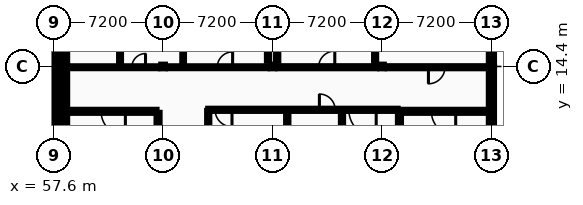
"""IFC4 building model, lengths in metres.
Left out: names, types, materials, properties, quantities, classifications, styles, units other than length and angle.
Written with IfcOpenShell. Run it as: python <this file> out.ifc"""

import sys

from ifc_helpers import new_model, si_unit, direction, frame, frame_2d, origin, origin_2d, place, context, subcontext, project, spatial, rectangle, i_section, extrude, element, fill, save


model = new_model("IFC4")
c1 = context("Model", 3, precision=1e-05, world=origin(), true_north=direction((0.0, 1.0)))
c2 = subcontext(c1, "Body", "Model", "MODEL_VIEW")
j1 = project(units=[si_unit("LENGTHUNIT", "METRE"), si_unit("PLANEANGLEUNIT", "RADIAN")], contexts=[c1])
p1 = place(None, origin())
s1 = spatial("IfcSite", under=j1, at=p1, CompositionType="ELEMENT")
p2 = place(p1, origin())
s2 = spatial("IfcBuilding", under=s1, at=p2, CompositionType="ELEMENT")
p3 = place(p2, frame((0.0, 0.0, 18.4)))
s3 = spatial("IfcBuildingStorey", under=s2, at=p3, CompositionType="ELEMENT", Elevation=18.4)
for number, where, z_axis, x_axis in (
    (1, (57.6, 14.4, 0.0), (0.0, 0.0, 1.0), (1.0, 0.0, 0.0)),
    (2, (58.32, 14.4, 0.0), (0.0, 0.0, 1.0), (1.0, 0.0, 0.0)),
    (3, (64.8, 14.4, 0.0), (0.0, 0.0, 1.0), (1.0, 0.0, 0.0)),
    (4, (72.0, 14.4, 0.0), (0.0, 0.0, 1.0), (1.0, 0.0, 0.0)),
    (5, (79.2, 14.4, 0.0), (0.0, 0.0, 1.0), (1.0, 0.0, 0.0)),
    (6, (86.4, 14.4, 0.0), (0.0, 0.0, 1.0), (1.0, 0.0, 0.0)),
):
    element("IfcColumn", number, at=place(p3, frame(where, z_axis=z_axis, x_axis=x_axis)), inside=s3, PredefinedType="COLUMN", context=c2, shape_type="SweptSolid", body=[
        extrude(i_section(OverallWidth=0.24, OverallDepth=0.24, WebThickness=0.01, FlangeThickness=0.017, FilletRadius=0.021, at=origin_2d()), origin(), (0.0, 0.0, 1.0), 4.4),
    ])
p4 = place(p3, frame((57.6, 8.9, 0.0), z_axis=(0.0, 0.0, 1.0), x_axis=(0.0, 1.0, 0.0)))
e7 = element("IfcWall", 7, at=p4, inside=s3, PredefinedType="STANDARD", context=c2, shape_type="SweptSolid", body=[
    extrude(rectangle(XDim=5.5, YDim=0.34, at=frame_2d((2.75, 0.0))), origin(), (0.0, 0.0, 1.0), 4.11),
])
p5 = place(p3, frame((57.6, 14.4, 0.0), z_axis=(0.0, 0.0, 1.0), x_axis=(0.0, 1.0, 0.0)))
e8 = element("IfcWall", 8, at=p5, inside=s3, PredefinedType="STANDARD", context=c2, shape_type="SweptSolid", body=[
    extrude(rectangle(XDim=7.37, YDim=0.34, at=frame_2d((3.685, 0.0))), origin(), (0.0, 0.0, 1.0), 4.11),
])
p6 = place(p5, frame((1.311, 0.0, 0.95)))
e9 = element("IfcOpeningElement", 9, at=p6, cuts=e8, PredefinedType="OPENING", context=c2, shape_type="SweptSolid", body=[
    extrude(rectangle(XDim=1.8, YDim=1.85, at=frame_2d((0.9, 0.925))), frame((0.0, 0.18, 0.0), z_axis=(0.0, -1.0, 0.0), x_axis=(1.0, 0.0, 0.0)), (0.0, 0.0, 1.0), 0.36),
])
p7 = place(p5, frame((4.259, 0.0, 0.95)))
e10 = element("IfcOpeningElement", 10, at=p7, cuts=e8, PredefinedType="OPENING", context=c2, shape_type="SweptSolid", body=[
    extrude(rectangle(XDim=1.8, YDim=1.85, at=frame_2d((0.9, 0.925))), frame((0.0, 0.18, 0.0), z_axis=(0.0, -1.0, 0.0), x_axis=(1.0, 0.0, 0.0)), (0.0, 0.0, 1.0), 0.36),
])
p8 = place(p3, frame((58.32, 14.4, 0.0), z_axis=(0.0, 0.0, 1.0), x_axis=(0.0, -1.0, 0.0)))
e11 = element("IfcWall", 11, at=p8, inside=s3, PredefinedType="STANDARD", context=c2, shape_type="SweptSolid", body=[
    extrude(rectangle(XDim=5.5, YDim=0.34, at=frame_2d((2.75, 0.0))), origin(), (0.0, 0.0, 1.0), 4.11),
])
p9 = place(p3, frame((58.32, 21.77, 0.0), z_axis=(0.0, 0.0, 1.0), x_axis=(0.0, -1.0, 0.0)))
e12 = element("IfcWall", 12, at=p9, inside=s3, PredefinedType="STANDARD", context=c2, shape_type="SweptSolid", body=[
    extrude(rectangle(XDim=7.37, YDim=0.34, at=frame_2d((3.685, 0.0))), origin(), (0.0, 0.0, 1.0), 4.11),
])
p10 = place(p9, frame((1.594, 0.0, 0.95)))
e13 = element("IfcOpeningElement", 13, at=p10, cuts=e12, PredefinedType="OPENING", context=c2, shape_type="SweptSolid", body=[
    extrude(rectangle(XDim=1.234, YDim=1.368, at=frame_2d((0.617, 0.684))), frame((0.0, 0.18, 0.0), z_axis=(0.0, -1.0, 0.0), x_axis=(1.0, 0.0, 0.0)), (0.0, 0.0, 1.0), 0.36),
])
p11 = place(p9, frame((4.542, 0.0, 0.95)))
e14 = element("IfcOpeningElement", 14, at=p11, cuts=e12, PredefinedType="OPENING", context=c2, shape_type="SweptSolid", body=[
    extrude(rectangle(XDim=1.234, YDim=1.368, at=frame_2d((0.617, 0.684))), frame((0.0, 0.18, 0.0), z_axis=(0.0, -1.0, 0.0), x_axis=(1.0, 0.0, 0.0)), (0.0, 0.0, 1.0), 0.36),
])
p12 = place(p3, frame((86.4, 8.9, 0.0), z_axis=(0.0, 0.0, 1.0), x_axis=(0.0, 1.0, 0.0)))
e15 = element("IfcWall", 15, at=p12, inside=s3, PredefinedType="STANDARD", context=c2, shape_type="SweptSolid", body=[
    extrude(rectangle(XDim=5.5, YDim=0.34, at=frame_2d((2.75, 0.0))), origin(), (0.0, 0.0, 1.0), 4.11),
])
p13 = place(p3, frame((86.4, 14.4, 0.0), z_axis=(0.0, 0.0, 1.0), x_axis=(0.0, 1.0, 0.0)))
e16 = element("IfcWall", 16, at=p13, inside=s3, PredefinedType="STANDARD", context=c2, shape_type="SweptSolid", body=[
    extrude(rectangle(XDim=7.03, YDim=0.34, at=frame_2d((3.515, 0.0))), origin(), (0.0, 0.0, 1.0), 4.11),
])
p14 = place(p13, frame((1.679, 0.0, 0.95)))
e17 = element("IfcOpeningElement", 17, at=p14, cuts=e16, PredefinedType="OPENING", context=c2, shape_type="SweptSolid", body=[
    extrude(rectangle(XDim=0.86, YDim=1.404, at=frame_2d((0.43, 0.702))), frame((0.0, 0.18, 0.0), z_axis=(0.0, -1.0, 0.0), x_axis=(1.0, 0.0, 0.0)), (0.0, 0.0, 1.0), 0.36),
])
p15 = place(p13, frame((4.491, 0.0, 0.95)))
e18 = element("IfcOpeningElement", 18, at=p15, cuts=e16, PredefinedType="OPENING", context=c2, shape_type="SweptSolid", body=[
    extrude(rectangle(XDim=0.86, YDim=1.404, at=frame_2d((0.43, 0.702))), frame((0.0, 0.18, 0.0), z_axis=(0.0, -1.0, 0.0), x_axis=(1.0, 0.0, 0.0)), (0.0, 0.0, 1.0), 0.36),
])
p16 = place(p3, frame((58.32, 0.2, 4.4), z_axis=(0.0, 0.0, 1.0), x_axis=(0.0, 1.0, 0.0)))
e19 = element("IfcWall", 19, at=p16, inside=s3, PredefinedType="PARAPET", context=c2, shape_type="SweptSolid", body=[
    extrude(rectangle(XDim=21.2, YDim=0.2, at=frame_2d((10.6, 0.0))), origin(), (0.0, 0.0, 1.0), 0.55),
])
p17 = place(p3, frame((58.67, 11.45, 0.0), z_axis=(0.0, 0.0, 1.0), x_axis=(1.0, 0.0, 0.0)))
e20 = element("IfcWall", 20, at=p17, inside=s3, PredefinedType="PARTITIONING", context=c2, shape_type="SweptSolid", body=[
    extrude(rectangle(XDim=5.7, YDim=0.2, at=frame_2d((2.85, 0.0))), origin(), (0.0, 0.0, 1.0), 4.18),
])
p18 = place(p17, frame((2.05, 0.0, 0.0)))
e21 = element("IfcOpeningElement", 21, at=p18, cuts=e20, PredefinedType="OPENING", context=c2, shape_type="SweptSolid", body=[
    extrude(rectangle(XDim=1.6, YDim=2.2, at=frame_2d((0.8, 1.1))), frame((0.0, 0.11, 0.0), z_axis=(0.0, -1.0, 0.0), x_axis=(1.0, 0.0, 0.0)), (0.0, 0.0, 1.0), 0.22),
])
p19 = place(p3, frame((64.47, 8.9, 0.0), z_axis=(0.0, 0.0, 1.0), x_axis=(0.0, 1.0, 0.0)))
e22 = element("IfcWall", 22, at=p19, inside=s3, PredefinedType="PARTITIONING", context=c2, shape_type="SweptSolid", body=[
    extrude(rectangle(XDim=2.45, YDim=0.2, at=frame_2d((1.225, 0.0))), origin(), (0.0, 0.0, 1.0), 4.18),
])
p20 = place(p3, frame((80.45, 11.45, 0.0), z_axis=(0.0, 0.0, 1.0), x_axis=(1.0, 0.0, 0.0)))
e23 = element("IfcWall", 23, at=p20, inside=s3, PredefinedType="PARTITIONING", context=c2, shape_type="SweptSolid", body=[
    extrude(rectangle(XDim=5.6, YDim=0.2, at=frame_2d((2.8, 0.0))), origin(), (0.0, 0.0, 1.0), 4.18),
])
p21 = place(p20, frame((2.0, 0.0, 0.0)))
e24 = element("IfcOpeningElement", 24, at=p21, cuts=e23, PredefinedType="OPENING", context=c2, shape_type="SweptSolid", body=[
    extrude(rectangle(XDim=1.6, YDim=2.2, at=frame_2d((0.8, 1.1))), frame((0.0, 0.11, 0.0), z_axis=(0.0, -1.0, 0.0), x_axis=(1.0, 0.0, 0.0)), (0.0, 0.0, 1.0), 0.22),
])
p22 = place(p3, frame((80.35, 8.9, 0.0), z_axis=(0.0, 0.0, 1.0), x_axis=(0.0, 1.0, 0.0)))
e25 = element("IfcWall", 25, at=p22, inside=s3, PredefinedType="PARTITIONING", context=c2, shape_type="SweptSolid", body=[
    extrude(rectangle(XDim=2.45, YDim=0.2, at=frame_2d((1.225, 0.0))), origin(), (0.0, 0.0, 1.0), 4.18),
])
p23 = place(p3, frame((67.77, 11.55, 0.0), z_axis=(0.0, 0.0, 1.0), x_axis=(1.0, 0.0, 0.0)))
e26 = element("IfcWall", 26, at=p23, inside=s3, PredefinedType="PARTITIONING", context=c2, shape_type="SweptSolid", body=[
    extrude(rectangle(XDim=12.46, YDim=0.142, at=frame_2d((6.23, 0.0))), origin(), (0.0, 0.0, 1.0), 4.18),
])
p24 = place(p23, frame((7.314, 0.0, 0.0)))
e27 = element("IfcOpeningElement", 27, at=p24, cuts=e26, PredefinedType="OPENING", context=c2, shape_type="SweptSolid", body=[
    extrude(rectangle(XDim=1.036, YDim=2.068, at=frame_2d((0.518, 1.034))), frame((0.0, 0.081, 0.0), z_axis=(0.0, -1.0, 0.0), x_axis=(1.0, 0.0, 0.0)), (0.0, 0.0, 1.0), 0.162),
])
p25 = place(p23, frame((9.25, 0.0, 0.0)))
e28 = element("IfcOpeningElement", 28, at=p25, cuts=e26, PredefinedType="OPENING", context=c2, shape_type="SweptSolid", body=[
    extrude(rectangle(XDim=1.8, YDim=2.3, at=frame_2d((0.9, 1.15))), frame((0.0, 0.081, 0.0), z_axis=(0.0, -1.0, 0.0), x_axis=(1.0, 0.0, 0.0)), (0.0, 0.0, 1.0), 0.162),
])
p26 = place(p23, frame((0.45, 0.0, 0.0)))
e29 = element("IfcOpeningElement", 29, at=p26, cuts=e26, PredefinedType="OPENING", context=c2, shape_type="SweptSolid", body=[
    extrude(rectangle(XDim=1.114, YDim=2.068, at=frame_2d((0.557, 1.034))), frame((0.0, 0.081, 0.0), z_axis=(0.0, -1.0, 0.0), x_axis=(1.0, 0.0, 0.0)), (0.0, 0.0, 1.0), 0.162),
])
p27 = place(p3, frame((58.7, 14.35, 0.0), z_axis=(0.0, 0.0, 1.0), x_axis=(1.0, 0.0, 0.0)))
e30 = element("IfcWall", 30, at=p27, inside=s3, PredefinedType="PARTITIONING", context=c2, shape_type="SweptSolid", body=[
    extrude(rectangle(XDim=5.72, YDim=0.125, at=frame_2d((2.86, 0.0))), origin(), (0.0, 0.0, 1.0), 4.035),
])
p28 = place(p27, frame((1.82, 0.0, 0.0)))
e31 = element("IfcOpeningElement", 31, at=p28, cuts=e30, PredefinedType="OPENING", context=c2, shape_type="SweptSolid", body=[
    extrude(rectangle(XDim=1.0, YDim=2.1, at=frame_2d((0.5, 1.05))), frame((0.0, 0.073, 0.0), z_axis=(0.0, -1.0, 0.0), x_axis=(1.0, 0.0, 0.0)), (0.0, 0.0, 1.0), 0.145),
])
p29 = place(p27, frame((4.045, 0.0, 0.0)))
e32 = element("IfcOpeningElement", 32, at=p29, cuts=e30, PredefinedType="OPENING", context=c2, shape_type="SweptSolid", body=[
    extrude(rectangle(XDim=0.9, YDim=2.1, at=frame_2d((0.45, 1.05))), frame((0.0, 0.073, 0.0), z_axis=(0.0, -1.0, 0.0), x_axis=(1.0, 0.0, 0.0)), (0.0, 0.0, 1.0), 0.145),
])
p30 = place(p3, frame((65.18, 14.35, 0.0), z_axis=(0.0, 0.0, 1.0), x_axis=(1.0, 0.0, 0.0)))
e33 = element("IfcWall", 33, at=p30, inside=s3, PredefinedType="PARTITIONING", context=c2, shape_type="SweptSolid", body=[
    extrude(rectangle(XDim=6.44, YDim=0.125, at=frame_2d((3.22, 0.0))), origin(), (0.0, 0.0, 1.0), 4.035),
])
p31 = place(p30, frame((3.185, 0.0, 0.0)))
e34 = element("IfcOpeningElement", 34, at=p31, cuts=e33, PredefinedType="OPENING", context=c2, shape_type="SweptSolid", body=[
    extrude(rectangle(XDim=1.01, YDim=2.068, at=frame_2d((0.505, 1.034))), frame((0.0, 0.073, 0.0), z_axis=(0.0, -1.0, 0.0), x_axis=(1.0, 0.0, 0.0)), (0.0, 0.0, 1.0), 0.145),
])
p32 = place(p3, frame((72.38, 14.35, 0.0), z_axis=(0.0, 0.0, 1.0), x_axis=(1.0, 0.0, 0.0)))
e35 = element("IfcWall", 35, at=p32, inside=s3, PredefinedType="PARTITIONING", context=c2, shape_type="SweptSolid", body=[
    extrude(rectangle(XDim=6.44, YDim=0.135, at=frame_2d((3.22, 0.0))), origin(), (0.0, 0.0, 1.0), 4.035),
])
p33 = place(p32, frame((2.654, 0.0, 0.0)))
e36 = element("IfcOpeningElement", 36, at=p33, cuts=e35, PredefinedType="OPENING", context=c2, shape_type="SweptSolid", body=[
    extrude(rectangle(XDim=1.062, YDim=2.068, at=frame_2d((0.531, 1.034))), frame((0.0, 0.078, 0.0), z_axis=(0.0, -1.0, 0.0), x_axis=(1.0, 0.0, 0.0)), (0.0, 0.0, 1.0), 0.155),
])
p34 = place(p3, frame((79.58, 14.35, 0.0), z_axis=(0.0, 0.0, 1.0), x_axis=(1.0, 0.0, 0.0)))
e37 = element("IfcWall", 37, at=p34, inside=s3, PredefinedType="PARTITIONING", context=c2, shape_type="SweptSolid", body=[
    extrude(rectangle(XDim=6.44, YDim=0.135, at=frame_2d((3.22, 0.0))), origin(), (0.0, 0.0, 1.0), 4.035),
])
p35 = place(p34, frame((2.676, 0.0, 0.0)))
e38 = element("IfcOpeningElement", 38, at=p35, cuts=e37, PredefinedType="OPENING", context=c2, shape_type="SweptSolid", body=[
    extrude(rectangle(XDim=1.088, YDim=2.068, at=frame_2d((0.544, 1.034))), frame((0.0, 0.078, 0.0), z_axis=(0.0, -1.0, 0.0), x_axis=(1.0, 0.0, 0.0)), (0.0, 0.0, 1.0), 0.155),
])
p36 = place(p3, frame((61.97, 14.413, 0.0), z_axis=(0.0, 0.0, 1.0), x_axis=(0.0, 1.0, 0.0)))
e39 = element("IfcWall", 39, at=p36, inside=s3, PredefinedType="PARTITIONING", context=c2, shape_type="SweptSolid", body=[
    extrude(rectangle(XDim=6.987, YDim=0.125, at=frame_2d((3.494, 0.0))), origin(), (0.0, 0.0, 1.0), 4.18),
])
p37 = place(p3, frame((66.12, 14.413, 0.0), z_axis=(0.0, 0.0, 1.0), x_axis=(0.0, 1.0, 0.0)))
e40 = element("IfcWall", 40, at=p37, inside=s3, PredefinedType="PARTITIONING", context=c2, shape_type="SweptSolid", body=[
    extrude(rectangle(XDim=6.932, YDim=0.11, at=frame_2d((3.466, 0.0))), origin(), (0.0, 0.0, 1.0), 4.18),
])
p38 = place(p3, frame((67.77, 3.36, 0.0), z_axis=(0.0, 0.0, 1.0), x_axis=(0.0, 1.0, 0.0)))
e41 = element("IfcWall", 41, at=p38, inside=s3, PredefinedType="PARTITIONING", context=c2, shape_type="SweptSolid", body=[
    extrude(rectangle(XDim=8.119, YDim=0.142, at=frame_2d((4.06, 0.0))), origin(), (0.0, 0.0, 1.0), 4.18),
])
p39 = place(p3, frame((71.7, 14.78, 0.0), z_axis=(0.0, 0.0, 1.0), x_axis=(0.0, 1.0, 0.0)))
e42 = element("IfcWall", 42, at=p39, inside=s3, PredefinedType="PARTITIONING", context=c2, shape_type="SweptSolid", body=[
    extrude(rectangle(XDim=6.44, YDim=0.135, at=frame_2d((3.22, 0.0))), origin(), (0.0, 0.0, 1.0), 4.18),
])
p40 = place(p3, frame((72.3, 14.78, 0.0), z_axis=(0.0, 0.0, 1.0), x_axis=(0.0, 1.0, 0.0)))
e43 = element("IfcWall", 43, at=p40, inside=s3, PredefinedType="PARTITIONING", context=c2, shape_type="SweptSolid", body=[
    extrude(rectangle(XDim=6.44, YDim=0.16, at=frame_2d((3.22, 0.0))), origin(), (0.0, 0.0, 1.0), 4.18),
])
p41 = place(p3, frame((72.97, 0.2, 0.0), z_axis=(0.0, 0.0, 1.0), x_axis=(0.0, 1.0, 0.0)))
e44 = element("IfcWall", 44, at=p41, inside=s3, PredefinedType="PARTITIONING", context=c2, shape_type="SweptSolid", body=[
    extrude(rectangle(XDim=11.279, YDim=0.15, at=frame_2d((5.64, 0.0))), origin(), (0.0, 0.0, 1.0), 4.18),
])
p42 = place(p3, frame((76.57, 0.2, 0.0), z_axis=(0.0, 0.0, 1.0), x_axis=(0.0, 1.0, 0.0)))
e45 = element("IfcWall", 45, at=p42, inside=s3, PredefinedType="PARTITIONING", context=c2, shape_type="SweptSolid", body=[
    extrude(rectangle(XDim=11.279, YDim=0.142, at=frame_2d((5.64, 0.0))), origin(), (0.0, 0.0, 1.0), 4.18),
])
p43 = place(p3, frame((78.75, 14.417, 0.0), z_axis=(0.0, 0.0, 1.0), x_axis=(0.0, 1.0, 0.0)))
e46 = element("IfcWall", 46, at=p43, inside=s3, PredefinedType="PARTITIONING", context=c2, shape_type="SweptSolid", body=[
    extrude(rectangle(XDim=6.912, YDim=0.135, at=frame_2d((3.456, 0.0))), origin(), (0.0, 0.0, 1.0), 4.18),
])
p44 = place(p18, origin())
e47 = element("IfcDoor", 47, at=p44, inside=s3, OperationType="DOUBLE_DOOR_SINGLE_SWING", PredefinedType="DOOR", context=c2, shape_type="SweptSolid", body=[
    extrude(rectangle(XDim=1.6, YDim=2.2, at=frame_2d((0.8, 1.1))), frame((0.0, 0.025, 0.0), z_axis=(0.0, -1.0, 0.0), x_axis=(1.0, 0.0, 0.0)), (0.0, 0.0, 1.0), 0.05),
])
fill(e21, e47)
p45 = place(p21, origin())
e48 = element("IfcDoor", 48, at=p45, inside=s3, OperationType="DOUBLE_DOOR_SINGLE_SWING", PredefinedType="DOOR", context=c2, shape_type="SweptSolid", body=[
    extrude(rectangle(XDim=1.6, YDim=2.2, at=frame_2d((0.8, 1.1))), frame((0.0, 0.025, 0.0), z_axis=(0.0, -1.0, 0.0), x_axis=(1.0, 0.0, 0.0)), (0.0, 0.0, 1.0), 0.05),
])
fill(e24, e48)
p46 = place(p28, frame((1.0, 0.0, 0.0), z_axis=(0.0, 0.0, 1.0), x_axis=(-1.0, 0.0, 0.0)))
e49 = element("IfcDoor", 49, at=p46, inside=s3, OperationType="SLIDING_TO_LEFT", PredefinedType="DOOR", context=c2, shape_type="SweptSolid", body=[
    extrude(rectangle(XDim=1.0, YDim=2.1, at=frame_2d((0.5, 1.05))), frame((0.0, 0.025, 0.0), z_axis=(0.0, -1.0, 0.0), x_axis=(1.0, 0.0, 0.0)), (0.0, 0.0, 1.0), 0.05),
])
fill(e31, e49)
p47 = place(p29, frame((0.9, 0.0, 0.0), z_axis=(0.0, 0.0, 1.0), x_axis=(-1.0, 0.0, 0.0)))
e50 = element("IfcDoor", 50, at=p47, inside=s3, OperationType="SINGLE_SWING_RIGHT", PredefinedType="DOOR", context=c2, shape_type="SweptSolid", body=[
    extrude(rectangle(XDim=0.9, YDim=2.1, at=frame_2d((0.45, 1.05))), frame((0.0, 0.025, 0.0), z_axis=(0.0, -1.0, 0.0), x_axis=(1.0, 0.0, 0.0)), (0.0, 0.0, 1.0), 0.05),
])
fill(e32, e50)
p48 = place(p31, frame((1.01, 0.0, 0.0), z_axis=(0.0, 0.0, 1.0), x_axis=(-1.0, 0.0, 0.0)))
e51 = element("IfcDoor", 51, at=p48, inside=s3, OperationType="SINGLE_SWING_RIGHT", PredefinedType="DOOR", context=c2, shape_type="SweptSolid", body=[
    extrude(rectangle(XDim=1.01, YDim=2.068, at=frame_2d((0.505, 1.034))), frame((0.0, 0.025, 0.0), z_axis=(0.0, -1.0, 0.0), x_axis=(1.0, 0.0, 0.0)), (0.0, 0.0, 1.0), 0.05),
])
fill(e34, e51)
p49 = place(p24, origin())
e52 = element("IfcDoor", 52, at=p49, inside=s3, OperationType="SINGLE_SWING_LEFT", PredefinedType="DOOR", context=c2, shape_type="SweptSolid", body=[
    extrude(rectangle(XDim=1.036, YDim=2.068, at=frame_2d((0.518, 1.034))), frame((0.0, 0.025, 0.0), z_axis=(0.0, -1.0, 0.0), x_axis=(1.0, 0.0, 0.0)), (0.0, 0.0, 1.0), 0.05),
])
fill(e27, e52)
p50 = place(p25, origin())
e53 = element("IfcDoor", 53, at=p50, inside=s3, OperationType="DOUBLE_DOOR_SINGLE_SWING", PredefinedType="DOOR", context=c2, shape_type="SweptSolid", body=[
    extrude(rectangle(XDim=1.8, YDim=2.3, at=frame_2d((0.9, 1.15))), frame((0.0, 0.025, 0.0), z_axis=(0.0, -1.0, 0.0), x_axis=(1.0, 0.0, 0.0)), (0.0, 0.0, 1.0), 0.05),
])
fill(e28, e53)
p51 = place(p33, frame((1.062, 0.0, 0.0), z_axis=(0.0, 0.0, 1.0), x_axis=(-1.0, 0.0, 0.0)))
e54 = element("IfcDoor", 54, at=p51, inside=s3, OperationType="SINGLE_SWING_RIGHT", PredefinedType="DOOR", context=c2, shape_type="SweptSolid", body=[
    extrude(rectangle(XDim=1.062, YDim=2.068, at=frame_2d((0.531, 1.034))), frame((0.0, 0.025, 0.0), z_axis=(0.0, -1.0, 0.0), x_axis=(1.0, 0.0, 0.0)), (0.0, 0.0, 1.0), 0.05),
])
fill(e36, e54)
p52 = place(p35, frame((1.088, 0.0, 0.0), z_axis=(0.0, 0.0, 1.0), x_axis=(-1.0, 0.0, 0.0)))
e55 = element("IfcDoor", 55, at=p52, inside=s3, OperationType="SINGLE_SWING_LEFT", PredefinedType="DOOR", context=c2, shape_type="SweptSolid", body=[
    extrude(rectangle(XDim=1.088, YDim=2.068, at=frame_2d((0.544, 1.034))), frame((0.0, 0.025, 0.0), z_axis=(0.0, -1.0, 0.0), x_axis=(1.0, 0.0, 0.0)), (0.0, 0.0, 1.0), 0.05),
])
fill(e38, e55)
p53 = place(p26, origin())
e56 = element("IfcDoor", 56, at=p53, inside=s3, OperationType="SINGLE_SWING_RIGHT", PredefinedType="DOOR", context=c2, shape_type="SweptSolid", body=[
    extrude(rectangle(XDim=1.114, YDim=2.068, at=frame_2d((0.557, 1.034))), frame((0.0, 0.025, 0.0), z_axis=(0.0, -1.0, 0.0), x_axis=(1.0, 0.0, 0.0)), (0.0, 0.0, 1.0), 0.05),
])
fill(e29, e56)
save(model, sys.argv[1])
